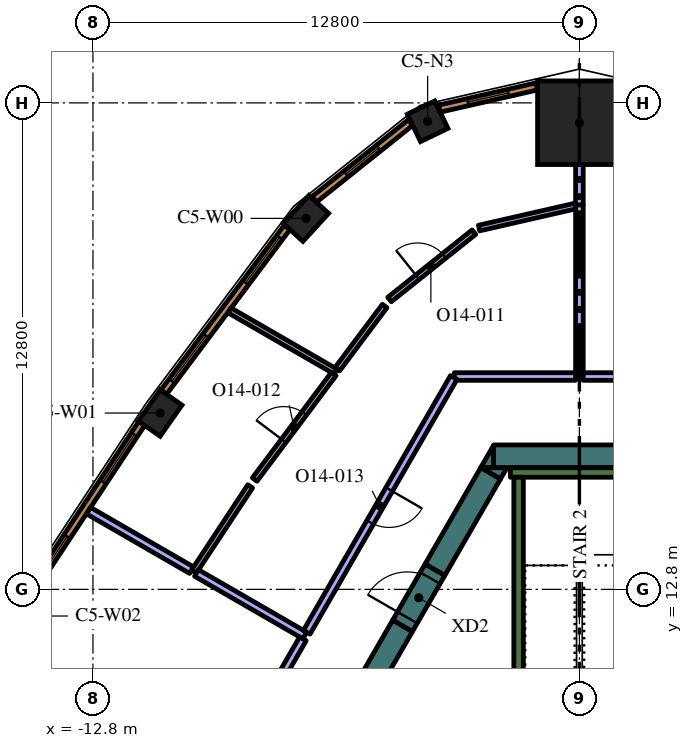
"""IFC4 building model, lengths in metres.
Left out: names, types, materials, properties, quantities, classifications, styles, units other than length and angle.
Written with IfcOpenShell. Run it as: python <this file> out.ifc"""

import sys

from ifc_helpers import new_model, si_unit, direction, frame, frame_2d, origin, origin_2d, place, context, subcontext, project, spatial, polyline, rectangle, outline, extrude, element, fill, save


model = new_model("IFC4")
c1 = context("Model", 3, precision=1e-05, world=origin(), true_north=direction((0.0, 1.0)))
c2 = subcontext(c1, "Body", "Model", "MODEL_VIEW")
j1 = project(units=[si_unit("LENGTHUNIT", "METRE"), si_unit("PLANEANGLEUNIT", "RADIAN")], contexts=[c1])
p1 = place(None, origin())
s1 = spatial("IfcSite", under=j1, at=p1, CompositionType="ELEMENT")
p2 = place(p1, origin())
s2 = spatial("IfcBuilding", under=s1, at=p2, CompositionType="ELEMENT")
p3 = place(p2, frame((0.0, 0.0, 313.2)))
s3 = spatial("IfcBuildingStorey", under=s2, at=p3, CompositionType="ELEMENT", Elevation=313.2)
p4 = place(p3, frame((0.0, 25.078, 0.0), z_axis=(0.0, 0.0, 1.0), x_axis=(0.0, 1.0, 0.0)))
e1 = element("IfcColumn", 1, at=p4, inside=s3, PredefinedType="COLUMN", context=c2, shape_type="SweptSolid", body=[
    extrude(rectangle(XDim=2.2, YDim=2.2, at=origin_2d()), origin(), (0.0, 0.0, 1.0), 4.2),
])
p5 = place(p3, frame((-3.993, 25.116, 0.0), z_axis=(0.0, 0.0, 1.0), x_axis=(-0.900873321869, -0.434082086644, 0.0)))
e2 = element("IfcColumn", 2, at=p5, inside=s3, PredefinedType="COLUMN", context=c2, shape_type="SweptSolid", body=[
    extrude(rectangle(XDim=0.8, YDim=0.8, at=origin_2d()), origin(), (0.0, 0.0, 1.0), 4.2),
])
for number, where, z_axis, x_axis in (
    (3, (-7.195, 22.561, 0.0), (0.0, 0.0, 1.0), (-0.676, -0.737, 0.0)),
    (4, (-11.032, 17.44, 0.0), (0.0, 0.0, 1.0), (-0.575, -0.818, 0.0)),
):
    element("IfcColumn", number, at=place(p3, frame(where, z_axis=z_axis, x_axis=x_axis)), inside=s3, PredefinedType="COLUMN", context=c2, shape_type="SweptSolid", body=[
        extrude(rectangle(XDim=1.0, YDim=0.7, at=origin_2d()), origin(), (0.0, 0.0, 1.0), 4.2),
    ])
p6 = place(p3, frame((-2.258, 16.3, 0.0), z_axis=(0.0, 0.0, 1.0), x_axis=(1.0, 0.0, 0.0)))
e5 = element("IfcWall", 5, at=p6, inside=s3, PredefinedType="SOLIDWALL", context=c2, shape_type="SweptSolid", body=[
    extrude(rectangle(XDim=3.823, YDim=0.6, at=frame_2d((1.912, 0.0))), origin(), (0.0, 0.0, 1.0), 4.2),
])
p7 = place(p3, origin())
e6 = element("IfcWall", 6, at=p7, inside=s3, PredefinedType="SOLIDWALL", context=c2, shape_type="SweptSolid", body=[
    extrude(outline(polyline([(-2.598, 16.0), (-2.26, 16.585), (-2.26, 16.0), (-2.598, 16.0)])), origin(), (0.0, 0.0, 1.0), 4.2),
])
p8 = place(p3, frame((-2.335, 15.855, 0.0), z_axis=(0.0, 0.0, 1.0), x_axis=(-0.499960127962, -0.866048422692, 0.0)))
e7 = element("IfcWall", 7, at=p8, inside=s3, PredefinedType="SOLIDWALL", context=c2, shape_type="SweptSolid", body=[
    extrude(rectangle(XDim=2.934, YDim=0.6, at=frame_2d((1.467, 0.0))), origin(), (0.0, 0.0, 1.0), 4.2),
])
e8 = element("IfcWall", 8, at=p7, inside=s3, PredefinedType="SOLIDWALL", context=c2, shape_type="SweptSolid", body=[
    extrude(outline(polyline([(-1.905, 16.0), (-2.074, 15.707), (-2.581, 16.0), (-1.905, 16.0)])), origin(), (0.0, 0.0, 1.0), 4.2),
])
p9 = place(p3, frame((-12.582, -1.892, 0.0), z_axis=(0.0, 0.0, 1.0), x_axis=(0.500003640647, 0.866023301845, 0.0)))
e9 = element("IfcWall", 9, at=p9, inside=s3, PredefinedType="SOLIDWALL", context=c2, shape_type="SweptSolid", body=[
    extrude(rectangle(XDim=15.858, YDim=0.6, at=frame_2d((7.929, 0.0))), origin(), (0.0, 0.0, 1.0), 4.2),
])
p10 = place(p3, frame((-1.817, 15.875, 0.0), z_axis=(0.0, 0.0, 1.0), x_axis=(1.0, 0.0, 0.0)))
e10 = element("IfcWall", 10, at=p10, inside=s3, PredefinedType="SOLIDWALL", context=c2, shape_type="SweptSolid", body=[
    extrude(rectangle(XDim=3.634, YDim=0.25, at=frame_2d((1.817, 0.0))), origin(), (0.0, 0.0, 1.0), 4.2),
])
p11 = place(p3, frame((-1.6, 8.7, 0.0), z_axis=(0.0, 0.0, 1.0), x_axis=(0.0, 1.0, 0.0)))
e11 = element("IfcWall", 11, at=p11, inside=s3, PredefinedType="SOLIDWALL", context=c2, shape_type="SweptSolid", body=[
    extrude(rectangle(XDim=7.05, YDim=0.25, at=frame_2d((3.525, 0.0))), origin(), (0.0, 0.0, 1.0), 4.2),
])
p12 = place(p3, frame((-4.652, 11.842, 0.0), z_axis=(0.0, 0.0, 1.0), x_axis=(0.500062241894, 0.865989465428, 0.0)))
e12 = element("IfcWall", 12, at=p12, inside=s3, PredefinedType="SOLIDWALL", context=c2, shape_type="SweptSolid", body=[
    extrude(rectangle(XDim=1.7, YDim=0.6, at=frame_2d((0.85, 0.0))), origin(), (0.0, 0.0, 1.0), 4.2),
])
p13 = place(p12, frame((0.25, 0.0, 0.0)))
e13 = element("IfcOpeningElement", 13, at=p13, cuts=e12, PredefinedType="OPENING", context=c2, shape_type="SweptSolid", body=[
    extrude(rectangle(XDim=1.2, YDim=2.1, at=frame_2d((0.6, 1.05))), frame((0.0, 0.31, 0.0), z_axis=(0.0, -1.0, 0.0), x_axis=(1.0, 0.0, 0.0)), (0.0, 0.0, 1.0), 0.62),
])
p14 = place(p3, frame((0.0, 22.906, 0.0), z_axis=(0.0, 0.0, 1.0), x_axis=(0.0, 1.0, 0.0)))
e14 = element("IfcWall", 14, at=p14, inside=s3, PredefinedType="PARTITIONING", context=c2, shape_type="SweptSolid", body=[
    extrude(rectangle(XDim=1.072, YDim=0.2, at=frame_2d((0.536, 0.0))), origin(), (0.0, 0.0, 1.0), 3.55),
])
p15 = place(p3, frame((0.0, 18.4, 0.0), z_axis=(0.0, 0.0, 1.0), x_axis=(0.0, 1.0, 0.0)))
e15 = element("IfcWall", 15, at=p15, inside=s3, PredefinedType="PARTITIONING", context=c2, shape_type="SweptSolid", body=[
    extrude(rectangle(XDim=4.514, YDim=0.2, at=frame_2d((2.257, 0.0))), origin(), (0.0, 0.0, 1.0), 3.55),
])
p16 = place(p3, frame((3.261, 18.4, 0.0), z_axis=(0.0, 0.0, 1.0), x_axis=(-1.0, 0.0, 0.0)))
e16 = element("IfcWall", 16, at=p16, inside=s3, PredefinedType="PARTITIONING", context=c2, shape_type="SweptSolid", body=[
    extrude(rectangle(XDim=3.161, YDim=0.2, at=frame_2d((1.581, 0.0))), origin(), (0.0, 0.0, 1.0), 3.55),
])
p17 = place(p3, frame((-6.417, 18.53, 0.0), z_axis=(0.0, 0.0, 1.0), x_axis=(-0.866034203951, 0.499984757355, 0.0)))
e17 = element("IfcWall", 17, at=p17, inside=s3, PredefinedType="PARTITIONING", context=c2, shape_type="SweptSolid", body=[
    extrude(rectangle(XDim=3.223, YDim=0.15, at=frame_2d((1.611, 0.0))), origin(), (0.0, 0.0, 1.0), 3.55),
])
p18 = place(p3, frame((-0.1, 22.887, 0.0), z_axis=(0.0, 0.0, 1.0), x_axis=(-0.974895716418, -0.222661945805, 0.0)))
e18 = element("IfcWall", 18, at=p18, inside=s3, PredefinedType="PARTITIONING", context=c2, shape_type="SweptSolid", body=[
    extrude(rectangle(XDim=2.605, YDim=0.15, at=frame_2d((1.303, 0.0))), origin(), (0.0, 0.0, 1.0), 3.55),
])
p19 = place(p3, frame((-4.995, 20.427, 0.0), z_axis=(0.0, 0.0, 1.0), x_axis=(0.781622833459, 0.62375134967, 0.0)))
e19 = element("IfcWall", 19, at=p19, inside=s3, PredefinedType="PARTITIONING", context=c2, shape_type="SweptSolid", body=[
    extrude(rectangle(XDim=2.841, YDim=0.15, at=frame_2d((1.42, 0.0))), origin(), (0.0, 0.0, 1.0), 3.55),
])
p20 = place(p19, frame((0.941, 0.0, 0.0)))
e20 = element("IfcOpeningElement", 20, at=p20, cuts=e19, PredefinedType="OPENING", context=c2, shape_type="SweptSolid", body=[
    extrude(rectangle(XDim=0.9, YDim=2.1, at=frame_2d((0.45, 1.05))), frame((0.0, 0.085, 0.0), z_axis=(0.0, -1.0, 0.0), x_axis=(1.0, 0.0, 0.0)), (0.0, 0.0, 1.0), 0.17),
])
p21 = place(p3, frame((-5.124, 20.256, 0.0), z_axis=(0.0, 0.0, 1.0), x_axis=(-0.599549274705, -0.800337845663, 0.0)))
e21 = element("IfcWall", 21, at=p21, inside=s3, PredefinedType="PARTITIONING", context=c2, shape_type="SweptSolid", body=[
    extrude(rectangle(XDim=2.08, YDim=0.15, at=frame_2d((1.04, 0.0))), origin(), (0.0, 0.0, 1.0), 3.55),
])
p22 = place(p3, frame((-8.544, 15.69, 0.0), z_axis=(0.0, 0.0, 1.0), x_axis=(0.599538824769, 0.800345673815, 0.0)))
e22 = element("IfcWall", 22, at=p22, inside=s3, PredefinedType="PARTITIONING", context=c2, shape_type="SweptSolid", body=[
    extrude(rectangle(XDim=3.474, YDim=0.15, at=frame_2d((1.737, 0.0))), origin(), (0.0, 0.0, 1.0), 3.55),
])
p23 = place(p22, frame((1.274, 0.0, 0.0)))
e23 = element("IfcOpeningElement", 23, at=p23, cuts=e22, PredefinedType="OPENING", context=c2, shape_type="SweptSolid", body=[
    extrude(rectangle(XDim=0.9, YDim=2.1, at=frame_2d((0.45, 1.05))), frame((0.0, 0.085, 0.0), z_axis=(0.0, -1.0, 0.0), x_axis=(1.0, 0.0, 0.0)), (0.0, 0.0, 1.0), 0.17),
])
p24 = place(p3, frame((-8.662, 15.511, 0.0), z_axis=(0.0, 0.0, 1.0), x_axis=(-0.550792824442, -0.834641997831, 0.0)))
e24 = element("IfcWall", 24, at=p24, inside=s3, PredefinedType="PARTITIONING", context=c2, shape_type="SweptSolid", body=[
    extrude(rectangle(XDim=2.686, YDim=0.15, at=frame_2d((1.343, 0.0))), origin(), (0.0, 0.0, 1.0), 3.55),
])
p25 = place(p3, frame((-10.207, 13.306, 0.0), z_axis=(0.0, 0.0, 1.0), x_axis=(-0.866041434906, 0.499972232254, 0.0)))
e25 = element("IfcWall", 25, at=p25, inside=s3, PredefinedType="PARTITIONING", context=c2, shape_type="SweptSolid", body=[
    extrude(rectangle(XDim=3.131, YDim=0.2, at=frame_2d((1.565, 0.0))), origin(), (0.0, 0.0, 1.0), 3.55),
])
p26 = place(p3, frame((-7.226, 11.585, 0.0), z_axis=(0.0, 0.0, 1.0), x_axis=(-0.866034923029, 0.499983511822, 0.0)))
e26 = element("IfcWall", 26, at=p26, inside=s3, PredefinedType="PARTITIONING", context=c2, shape_type="SweptSolid", body=[
    extrude(rectangle(XDim=3.292, YDim=0.2, at=frame_2d((1.646, 0.0))), origin(), (0.0, 0.0, 1.0), 3.55),
])
p27 = place(p3, frame((-0.1, 18.4, 0.0), z_axis=(0.0, 0.0, 1.0), x_axis=(-1.0, 0.0, 0.0)))
e27 = element("IfcWall", 27, at=p27, inside=s3, PredefinedType="PARTITIONING", context=c2, shape_type="SweptSolid", body=[
    extrude(rectangle(XDim=3.191, YDim=0.2, at=frame_2d((1.595, 0.0))), origin(), (0.0, 0.0, 1.0), 3.55),
])
p28 = place(p3, frame((-3.306, 18.374, 0.0), z_axis=(0.0, 0.0, 1.0), x_axis=(-0.500000072396, -0.866025361987, 0.0)))
e28 = element("IfcWall", 28, at=p28, inside=s3, PredefinedType="PARTITIONING", context=c2, shape_type="SweptSolid", body=[
    extrude(rectangle(XDim=7.739, YDim=0.2, at=frame_2d((3.87, 0.0))), origin(), (0.0, 0.0, 1.0), 3.55),
])
p29 = place(p28, frame((3.4, 0.0, 0.0)))
e29 = element("IfcOpeningElement", 29, at=p29, cuts=e28, PredefinedType="OPENING", context=c2, shape_type="SweptSolid", body=[
    extrude(rectangle(XDim=1.0, YDim=2.1, at=frame_2d((0.5, 1.05))), frame((0.0, 0.11, 0.0), z_axis=(0.0, -1.0, 0.0), x_axis=(1.0, 0.0, 0.0)), (0.0, 0.0, 1.0), 0.22),
])
p30 = place(p3, frame((-7.275, 11.499, 0.0), z_axis=(0.0, 0.0, 1.0), x_axis=(-0.500025407441, -0.866010734295, 0.0)))
e30 = element("IfcWall", 30, at=p30, inside=s3, PredefinedType="PARTITIONING", context=c2, shape_type="SweptSolid", body=[
    extrude(rectangle(XDim=1.791, YDim=0.2, at=frame_2d((0.895, 0.0))), origin(), (0.0, 0.0, 1.0), 3.55),
])
p31 = place(p3, frame((-1.122, 26.033, 0.0), z_axis=(0.0, 0.0, 1.0), x_axis=(-0.974913273386, -0.222585060988, 0.0)))
e31 = element("IfcWall", 31, at=p31, inside=s3, PredefinedType="SOLIDWALL", context=c2, shape_type="SweptSolid", body=[
    extrude(rectangle(XDim=2.627, YDim=0.19, at=frame_2d((1.313, 0.0))), origin(), (0.0, 0.0, 1.0), 3.95),
])
p32 = place(p31, frame((0.763, 0.0, 0.6)))
e32 = element("IfcOpeningElement", 32, at=p32, cuts=e31, PredefinedType="OPENING", context=c2, shape_type="SweptSolid", body=[
    extrude(rectangle(XDim=1.1, YDim=2.85, at=frame_2d((0.55, 1.425))), frame((0.0, 0.105, 0.0), z_axis=(0.0, -1.0, 0.0), x_axis=(1.0, 0.0, 0.0)), (0.0, 0.0, 1.0), 0.21),
])
p33 = place(p3, frame((-4.448, 25.08, 0.0), z_axis=(0.0, 0.0, 1.0), x_axis=(-0.781626234064, -0.623747088349, 0.0)))
e33 = element("IfcWall", 33, at=p33, inside=s3, PredefinedType="SOLIDWALL", context=c2, shape_type="SweptSolid", body=[
    extrude(rectangle(XDim=3.237, YDim=0.19, at=frame_2d((1.618, 0.0))), origin(), (0.0, 0.0, 1.0), 3.95),
])
p34 = place(p33, frame((1.068, 0.0, 0.6)))
e34 = element("IfcOpeningElement", 34, at=p34, cuts=e33, PredefinedType="OPENING", context=c2, shape_type="SweptSolid", body=[
    extrude(rectangle(XDim=1.1, YDim=2.85, at=frame_2d((0.55, 1.425))), frame((0.0, 0.105, 0.0), z_axis=(0.0, -1.0, 0.0), x_axis=(1.0, 0.0, 0.0)), (0.0, 0.0, 1.0), 0.21),
])
p35 = place(p3, frame((-7.692, 22.324, 0.0), z_axis=(0.0, 0.0, 1.0), x_axis=(-0.599559865294, -0.800329911929, 0.0)))
e35 = element("IfcWall", 35, at=p35, inside=s3, PredefinedType="SOLIDWALL", context=c2, shape_type="SweptSolid", body=[
    extrude(rectangle(XDim=5.415, YDim=0.19, at=frame_2d((2.708, 0.0))), origin(), (0.0, 0.0, 1.0), 3.95),
])
p36 = place(p35, frame((0.323, 0.0, 0.6)))
e36 = element("IfcOpeningElement", 36, at=p36, cuts=e35, PredefinedType="OPENING", context=c2, shape_type="SweptSolid", body=[
    extrude(rectangle(XDim=1.5, YDim=2.85, at=frame_2d((0.75, 1.425))), frame((0.0, 0.105, 0.0), z_axis=(0.0, -1.0, 0.0), x_axis=(1.0, 0.0, 0.0)), (0.0, 0.0, 1.0), 0.21),
])
p37 = place(p35, frame((3.558, 0.0, 0.6)))
e37 = element("IfcOpeningElement", 37, at=p37, cuts=e35, PredefinedType="OPENING", context=c2, shape_type="SweptSolid", body=[
    extrude(rectangle(XDim=1.5, YDim=2.85, at=frame_2d((0.75, 1.425))), frame((0.0, 0.105, 0.0), z_axis=(0.0, -1.0, 0.0), x_axis=(1.0, 0.0, 0.0)), (0.0, 0.0, 1.0), 0.21),
])
p38 = place(p3, frame((-11.518, 17.166, 0.0), z_axis=(0.0, 0.0, 1.0), x_axis=(-0.550744054781, -0.83467417962, 0.0)))
e38 = element("IfcWall", 38, at=p38, inside=s3, PredefinedType="SOLIDWALL", context=c2, shape_type="SweptSolid", body=[
    extrude(rectangle(XDim=5.406, YDim=0.19, at=frame_2d((2.703, 0.0))), origin(), (0.0, 0.0, 1.0), 3.95),
])
p39 = place(p38, frame((0.346, 0.0, 0.6)))
e39 = element("IfcOpeningElement", 39, at=p39, cuts=e38, PredefinedType="OPENING", context=c2, shape_type="SweptSolid", body=[
    extrude(rectangle(XDim=1.5, YDim=2.85, at=frame_2d((0.75, 1.425))), frame((0.0, 0.105, 0.0), z_axis=(0.0, -1.0, 0.0), x_axis=(1.0, 0.0, 0.0)), (0.0, 0.0, 1.0), 0.21),
])
p40 = place(p38, frame((3.559, 0.0, 0.6)))
e40 = element("IfcOpeningElement", 40, at=p40, cuts=e38, PredefinedType="OPENING", context=c2, shape_type="SweptSolid", body=[
    extrude(rectangle(XDim=1.5, YDim=2.85, at=frame_2d((0.75, 1.425))), frame((0.0, 0.105, 0.0), z_axis=(0.0, -1.0, 0.0), x_axis=(1.0, 0.0, 0.0)), (0.0, 0.0, 1.0), 0.21),
])
p41 = place(p13, origin())
e41 = element("IfcDoor", 41, at=p41, inside=s3, OperationType="SINGLE_SWING_LEFT", PredefinedType="DOOR", context=c2, shape_type="SweptSolid", body=[
    extrude(rectangle(XDim=1.2, YDim=2.1, at=frame_2d((0.6, 1.05))), frame((0.0, 0.025, 0.0), z_axis=(0.0, -1.0, 0.0), x_axis=(1.0, 0.0, 0.0)), (0.0, 0.0, 1.0), 0.05),
])
fill(e13, e41)
p42 = place(p20, origin())
e42 = element("IfcDoor", 42, at=p42, inside=s3, OperationType="SINGLE_SWING_LEFT", PredefinedType="DOOR", context=c2, shape_type="SweptSolid", body=[
    extrude(rectangle(XDim=0.9, YDim=2.1, at=frame_2d((0.45, 1.05))), frame((0.0, 0.025, 0.0), z_axis=(0.0, -1.0, 0.0), x_axis=(1.0, 0.0, 0.0)), (0.0, 0.0, 1.0), 0.05),
])
fill(e20, e42)
p43 = place(p23, origin())
e43 = element("IfcDoor", 43, at=p43, inside=s3, OperationType="SINGLE_SWING_LEFT", PredefinedType="DOOR", context=c2, shape_type="SweptSolid", body=[
    extrude(rectangle(XDim=0.9, YDim=2.1, at=frame_2d((0.45, 1.05))), frame((0.0, 0.025, 0.0), z_axis=(0.0, -1.0, 0.0), x_axis=(1.0, 0.0, 0.0)), (0.0, 0.0, 1.0), 0.05),
])
fill(e23, e43)
p44 = place(p29, origin())
e44 = element("IfcDoor", 44, at=p44, inside=s3, OperationType="SINGLE_SWING_RIGHT", PredefinedType="DOOR", context=c2, shape_type="SweptSolid", body=[
    extrude(rectangle(XDim=1.0, YDim=2.1, at=frame_2d((0.5, 1.05))), frame((0.0, 0.025, 0.0), z_axis=(0.0, -1.0, 0.0), x_axis=(1.0, 0.0, 0.0)), (0.0, 0.0, 1.0), 0.05),
])
fill(e29, e44)
p45 = place(p32, origin())
e45 = element("IfcWindow", 45, at=p45, inside=s3, PartitioningType="SINGLE_PANEL", PredefinedType="WINDOW", context=c2, shape_type="SweptSolid", body=[
    extrude(rectangle(XDim=1.1, YDim=2.85, at=frame_2d((0.55, 1.425))), frame((0.0, 0.045, 0.0), z_axis=(0.0, -1.0, 0.0), x_axis=(1.0, 0.0, 0.0)), (0.0, 0.0, 1.0), 0.06),
])
fill(e32, e45)
p46 = place(p34, origin())
e46 = element("IfcWindow", 46, at=p46, inside=s3, PartitioningType="SINGLE_PANEL", PredefinedType="WINDOW", context=c2, shape_type="SweptSolid", body=[
    extrude(rectangle(XDim=1.1, YDim=2.85, at=frame_2d((0.55, 1.425))), frame((0.0, 0.045, 0.0), z_axis=(0.0, -1.0, 0.0), x_axis=(1.0, 0.0, 0.0)), (0.0, 0.0, 1.0), 0.06),
])
fill(e34, e46)
p47 = place(p36, origin())
e47 = element("IfcWindow", 47, at=p47, inside=s3, PartitioningType="SINGLE_PANEL", PredefinedType="WINDOW", context=c2, shape_type="SweptSolid", body=[
    extrude(rectangle(XDim=1.5, YDim=2.85, at=frame_2d((0.75, 1.425))), frame((0.0, 0.045, 0.0), z_axis=(0.0, -1.0, 0.0), x_axis=(1.0, 0.0, 0.0)), (0.0, 0.0, 1.0), 0.06),
])
fill(e36, e47)
p48 = place(p37, origin())
e48 = element("IfcWindow", 48, at=p48, inside=s3, PartitioningType="SINGLE_PANEL", PredefinedType="WINDOW", context=c2, shape_type="SweptSolid", body=[
    extrude(rectangle(XDim=1.5, YDim=2.85, at=frame_2d((0.75, 1.425))), frame((0.0, 0.045, 0.0), z_axis=(0.0, -1.0, 0.0), x_axis=(1.0, 0.0, 0.0)), (0.0, 0.0, 1.0), 0.06),
])
fill(e37, e48)
p49 = place(p39, origin())
e49 = element("IfcWindow", 49, at=p49, inside=s3, PartitioningType="SINGLE_PANEL", PredefinedType="WINDOW", context=c2, shape_type="SweptSolid", body=[
    extrude(rectangle(XDim=1.5, YDim=2.85, at=frame_2d((0.75, 1.425))), frame((0.0, 0.045, 0.0), z_axis=(0.0, -1.0, 0.0), x_axis=(1.0, 0.0, 0.0)), (0.0, 0.0, 1.0), 0.06),
])
fill(e39, e49)
p50 = place(p40, origin())
e50 = element("IfcWindow", 50, at=p50, inside=s3, PartitioningType="SINGLE_PANEL", PredefinedType="WINDOW", context=c2, shape_type="SweptSolid", body=[
    extrude(rectangle(XDim=1.5, YDim=2.85, at=frame_2d((0.75, 1.425))), frame((0.0, 0.045, 0.0), z_axis=(0.0, -1.0, 0.0), x_axis=(1.0, 0.0, 0.0)), (0.0, 0.0, 1.0), 0.06),
])
fill(e40, e50)
save(model, sys.argv[1])
